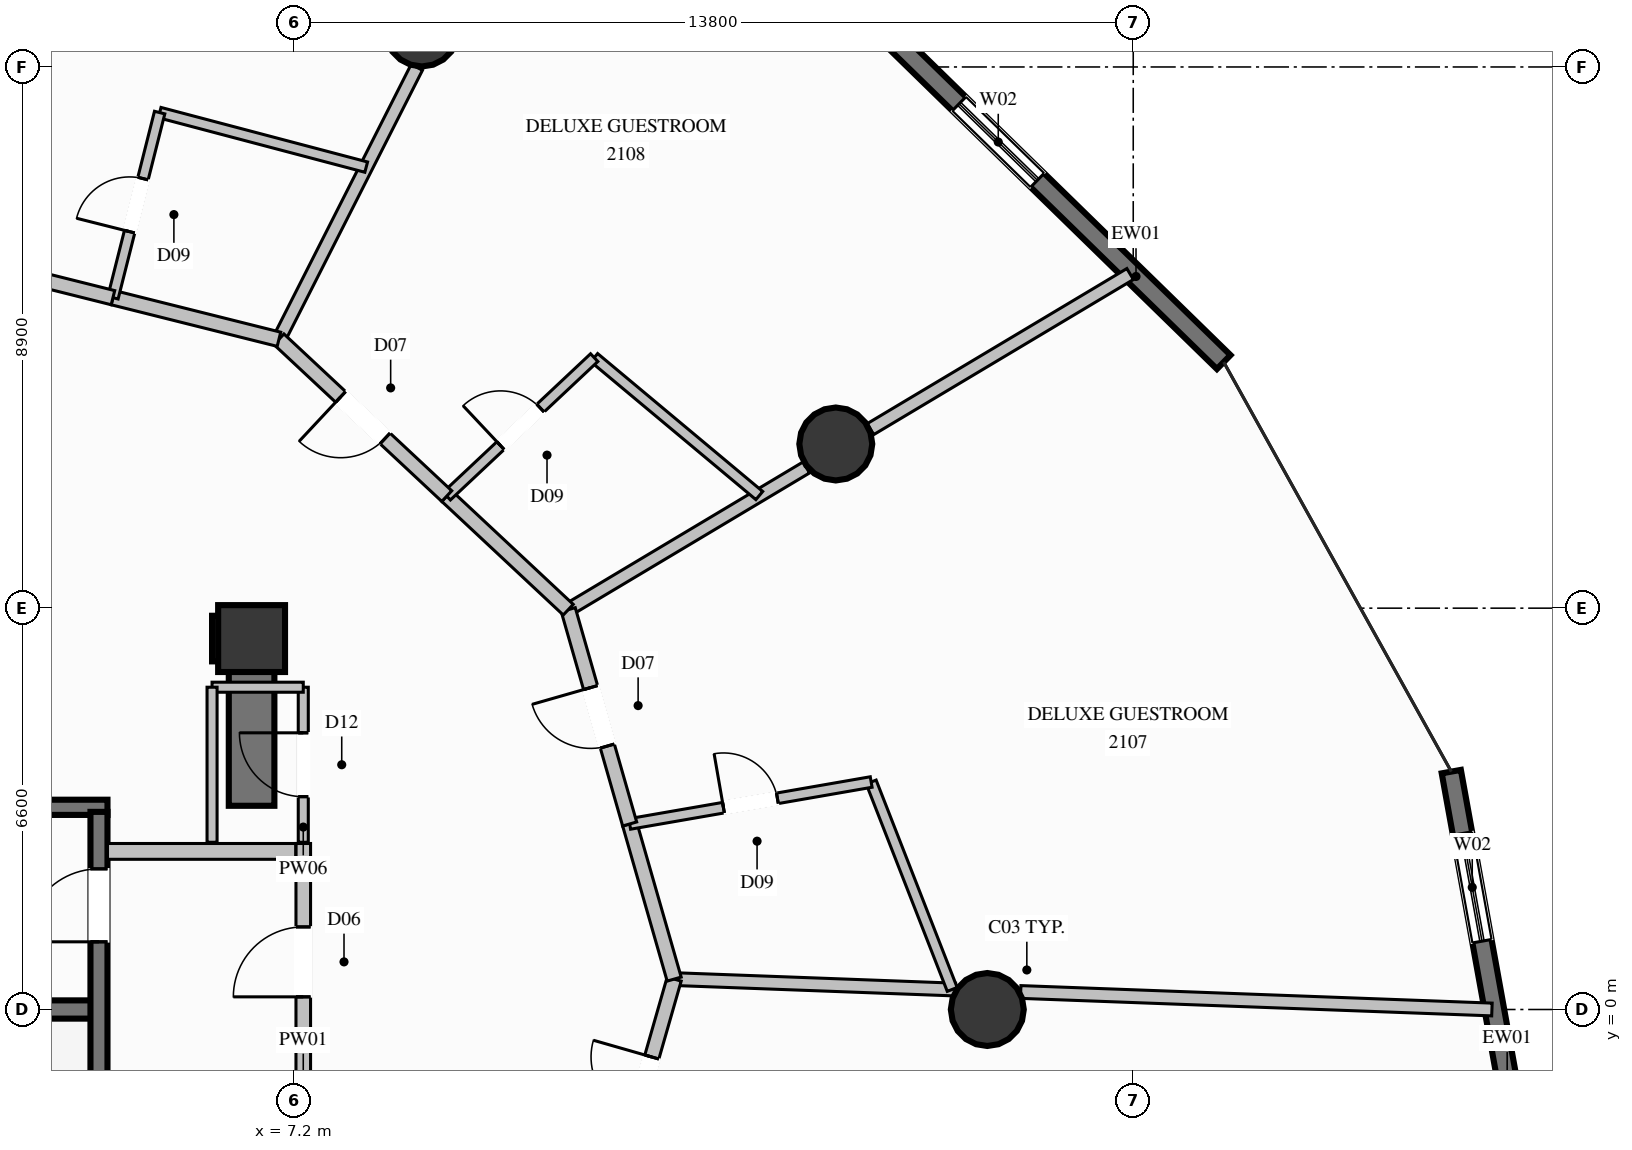
"""IFC4 building model, lengths in metres.
Left out: names, types, materials, properties, quantities, classifications, styles, units other than length and angle.
Written with IfcOpenShell. Run it as: python <this file> out.ifc"""

import sys

from ifc_helpers import new_model, si_unit, direction, frame, frame_2d, origin, origin_2d, place, context, subcontext, project, spatial, rectangle, circle, extrude, element, fill, save


model = new_model("IFC4")
c1 = context("Model", 3, precision=1e-05, world=origin(), true_north=direction((0.0, 1.0)))
c2 = subcontext(c1, "Body", "Model", "MODEL_VIEW")
j1 = project(units=[si_unit("LENGTHUNIT", "METRE"), si_unit("PLANEANGLEUNIT", "RADIAN")], contexts=[c1])
p1 = place(None, origin())
s1 = spatial("IfcSite", under=j1, at=p1, CompositionType="ELEMENT")
p2 = place(p1, origin())
s2 = spatial("IfcBuilding", under=s1, at=p2, CompositionType="ELEMENT")
p3 = place(p2, frame((0.0, 0.0, 78.8)))
s3 = spatial("IfcBuildingStorey", under=s2, at=p3, CompositionType="ELEMENT", Elevation=78.8)
p4 = place(p3, frame((6.5, 6.1, 0.0), z_axis=(0.0, 0.0, 1.0), x_axis=(1.0, 0.0, 0.0)))
e1 = element("IfcColumn", 1, at=p4, inside=s3, PredefinedType="COLUMN", context=c2, shape_type="SweptSolid", body=[
    extrude(rectangle(XDim=1.1, YDim=1.1, at=origin_2d()), origin(), (0.0, 0.0, 1.0), 3.6),
])
p5 = place(p3, frame((-3.99, 0.0, 0.0), z_axis=(0.0, 0.0, 1.0), x_axis=(1.0, 0.0, 0.0)))
e2 = element("IfcWall", 2, at=p5, inside=s3, PredefinedType="SHEAR", context=c2, shape_type="SweptSolid", body=[
    extrude(rectangle(XDim=7.98, YDim=0.3, at=frame_2d((3.99, 0.0))), origin(), (0.0, 0.0, 1.0), 3.6),
])
p6 = place(p3, frame((-4.13, 3.325, 0.0), z_axis=(0.0, 0.0, 1.0), x_axis=(1.0, 0.0, 0.0)))
e3 = element("IfcWall", 3, at=p6, inside=s3, PredefinedType="SOLIDWALL", context=c2, shape_type="SweptSolid", body=[
    extrude(rectangle(XDim=8.26, YDim=0.25, at=frame_2d((4.13, 0.0))), origin(), (0.0, 0.0, 1.0), 3.6),
])
p7 = place(p3, frame((5.85, 6.1, 0.0), z_axis=(0.0, 0.0, 1.0), x_axis=(1.0, 0.0, 0.0)))
e4 = element("IfcWall", 4, at=p7, inside=s3, PredefinedType="SHEAR", context=c2, shape_type="SweptSolid", body=[
    extrude(rectangle(XDim=0.275, YDim=0.75, at=frame_2d((0.137, 0.0))), origin(), (0.0, 0.0, 1.0), 3.6),
])
p8 = place(p3, frame((6.5, 3.35, 0.0), z_axis=(0.0, 0.0, 1.0), x_axis=(0.0, 1.0, 0.0)))
e5 = element("IfcWall", 5, at=p8, inside=s3, PredefinedType="SHEAR", context=c2, shape_type="SweptSolid", body=[
    extrude(rectangle(XDim=3.125, YDim=0.75, at=frame_2d((1.562, 0.0))), origin(), (0.0, 0.0, 1.0), 3.6),
])
for number, where, z_axis, x_axis in (
    (6, (18.6, 0.0, 0.0), (0.0, 0.0, 1.0), (1.0, 0.0, 0.0)),
    (7, (16.108, 9.3, 0.0), (0.0, 0.0, 1.0), (1.0, 0.0, 0.0)),
    (8, (9.3, 16.108, 0.0), (0.0, 0.0, 1.0), (1.0, 0.0, 0.0)),
):
    element("IfcColumn", number, at=place(p3, frame(where, z_axis=z_axis, x_axis=x_axis)), inside=s3, PredefinedType="COLUMN", context=c2, shape_type="SweptSolid", body=[
        extrude(circle(Radius=0.6, at=origin_2d()), origin(), (0.0, 0.0, 1.0), 3.6),
    ])
p9 = place(p3, frame((26.231, 3.912, 0.0), z_axis=(0.0, 0.0, 1.0), x_axis=(0.178065653106, -0.984018609165, 0.0)))
e9 = element("IfcWall", 9, at=p9, inside=s3, PredefinedType="SOLIDWALL", context=c2, shape_type="SweptSolid", body=[
    extrude(rectangle(XDim=7.234, YDim=0.32, at=frame_2d((3.617, 0.0))), origin(), (0.0, 0.0, 1.0), 3.34),
])
p10 = place(p9, frame((1.034, 0.0, 0.35)))
e10 = element("IfcOpeningElement", 10, at=p10, cuts=e9, PredefinedType="OPENING", context=c2, shape_type="SweptSolid", body=[
    extrude(rectangle(XDim=1.8, YDim=2.6, at=frame_2d((0.9, 1.3))), frame((0.0, 0.17, 0.0), z_axis=(0.0, -1.0, 0.0), x_axis=(1.0, 0.0, 0.0)), (0.0, 0.0, 1.0), 0.34),
])
p11 = place(p3, frame((16.656, 16.339, 0.0), z_axis=(0.0, 0.0, 1.0), x_axis=(0.715637667014, -0.698471709914, 0.0)))
e11 = element("IfcWall", 11, at=p11, inside=s3, PredefinedType="SOLIDWALL", context=c2, shape_type="SweptSolid", body=[
    extrude(rectangle(XDim=8.149, YDim=0.32, at=frame_2d((4.075, 0.0))), origin(), (0.0, 0.0, 1.0), 3.34),
])
p12 = place(p11, frame((2.068, 0.0, 0.35)))
e12 = element("IfcOpeningElement", 12, at=p12, cuts=e11, PredefinedType="OPENING", context=c2, shape_type="SweptSolid", body=[
    extrude(rectangle(XDim=1.8, YDim=2.6, at=frame_2d((0.9, 1.3))), frame((0.0, 0.17, 0.0), z_axis=(0.0, -1.0, 0.0), x_axis=(1.0, 0.0, 0.0)), (0.0, 0.0, 1.0), 0.34),
])
p13 = place(p3, frame((3.99, -2.21, 0.0), z_axis=(0.0, 0.0, 1.0), x_axis=(0.0, 1.0, 0.0)))
e13 = element("IfcWall", 13, at=p13, inside=s3, PredefinedType="SOLIDWALL", context=c2, shape_type="SweptSolid", body=[
    extrude(rectangle(XDim=5.46, YDim=0.28, at=frame_2d((2.73, 0.0))), origin(), (0.0, 0.0, 1.0), 3.34),
])
p14 = place(p13, frame((3.323, 0.0, 0.0)))
e14 = element("IfcOpeningElement", 14, at=p14, cuts=e13, PredefinedType="OPENING", context=c2, shape_type="SweptSolid", body=[
    extrude(rectangle(XDim=1.2, YDim=2.2, at=frame_2d((0.6, 1.1))), frame((0.0, 0.15, 0.0), z_axis=(0.0, -1.0, 0.0), x_axis=(1.0, 0.0, 0.0)), (0.0, 0.0, 1.0), 0.3),
])
p15 = place(p3, frame((7.35, -2.34, 0.0), z_axis=(0.0, 0.0, 1.0), x_axis=(0.0, 1.0, 0.0)))
e15 = element("IfcWall", 15, at=p15, inside=s3, PredefinedType="PARTITIONING", context=c2, shape_type="SweptSolid", body=[
    extrude(rectangle(XDim=5.07, YDim=0.24, at=frame_2d((2.535, 0.0))), origin(), (0.0, 0.0, 1.0), 2.425),
])
p16 = place(p15, frame((2.548, 0.0, 0.0)))
e16 = element("IfcOpeningElement", 16, at=p16, cuts=e15, PredefinedType="OPENING", context=c2, shape_type="SweptSolid", body=[
    extrude(rectangle(XDim=1.15, YDim=2.2, at=frame_2d((0.575, 1.1))), frame((0.0, 0.13, 0.0), z_axis=(0.0, -1.0, 0.0), x_axis=(1.0, 0.0, 0.0)), (0.0, 0.0, 1.0), 0.26),
])
p17 = place(p3, frame((4.13, 2.6, 0.0), z_axis=(0.0, 0.0, 1.0), x_axis=(1.0, 0.0, 0.0)))
e17 = element("IfcWall", 17, at=p17, inside=s3, PredefinedType="PARTITIONING", context=c2, shape_type="SweptSolid", body=[
    extrude(rectangle(XDim=3.095, YDim=0.26, at=frame_2d((1.548, 0.0))), origin(), (0.0, 0.0, 1.0), 3.34),
])
p18 = place(p3, frame((7.35, 2.75, 0.0), z_axis=(0.0, 0.0, 1.0), x_axis=(0.0, 1.0, 0.0)))
e18 = element("IfcWall", 18, at=p18, inside=s3, PredefinedType="PARTITIONING", context=c2, shape_type="SweptSolid", body=[
    extrude(rectangle(XDim=2.55, YDim=0.165, at=frame_2d((1.275, 0.0))), origin(), (0.0, 0.0, 1.0), 3.34),
])
p19 = place(p18, frame((0.75, 0.0, 0.0)))
e19 = element("IfcOpeningElement", 19, at=p19, cuts=e18, PredefinedType="OPENING", context=c2, shape_type="SweptSolid", body=[
    extrude(rectangle(XDim=1.05, YDim=2.15, at=frame_2d((0.525, 1.075))), frame((0.0, 0.093, 0.0), z_axis=(0.0, -1.0, 0.0), x_axis=(1.0, 0.0, 0.0)), (0.0, 0.0, 1.0), 0.185),
])
p20 = place(p3, frame((7.35, 5.3, 0.0), z_axis=(0.0, 0.0, 1.0), x_axis=(-1.0, 0.0, 0.0)))
e20 = element("IfcWall", 20, at=p20, inside=s3, PredefinedType="PARTITIONING", context=c2, shape_type="SweptSolid", body=[
    extrude(rectangle(XDim=1.5, YDim=0.165, at=frame_2d((0.75, 0.0))), origin(), (0.0, 0.0, 1.0), 2.425),
])
p21 = place(p3, frame((5.85, 5.3, 0.0), z_axis=(0.0, 0.0, 1.0), x_axis=(0.0, -1.0, 0.0)))
e21 = element("IfcWall", 21, at=p21, inside=s3, PredefinedType="PARTITIONING", context=c2, shape_type="SweptSolid", body=[
    extrude(rectangle(XDim=2.55, YDim=0.165, at=frame_2d((1.275, 0.0))), origin(), (0.0, 0.0, 1.0), 2.425),
])
p22 = place(p3, frame((13.45, 0.5, 0.0), z_axis=(0.0, 0.0, 1.0), x_axis=(0.999307950313, -0.037197048837, 0.0)))
e22 = element("IfcWall", 22, at=p22, inside=s3, PredefinedType="PARTITIONING", context=c2, shape_type="SweptSolid", body=[
    extrude(rectangle(XDim=4.627, YDim=0.21, at=frame_2d((2.313, 0.0))), origin(), (0.0, 0.0, 1.0), 3.34),
])
p23 = place(p3, frame((19.149, 0.288, 0.0), z_axis=(0.0, 0.0, 1.0), x_axis=(0.999309822295, -0.037146723485, 0.0)))
e23 = element("IfcWall", 23, at=p23, inside=s3, PredefinedType="PARTITIONING", context=c2, shape_type="SweptSolid", body=[
    extrude(rectangle(XDim=7.755, YDim=0.21, at=frame_2d((3.878, 0.0))), origin(), (0.0, 0.0, 1.0), 3.34),
])
p24 = place(p3, frame((11.708, 6.575, 0.0), z_axis=(0.0, 0.0, 1.0), x_axis=(0.858450301557, 0.512896753506, 0.0)))
e24 = element("IfcWall", 24, at=p24, inside=s3, PredefinedType="PARTITIONING", context=c2, shape_type="SweptSolid", body=[
    extrude(rectangle(XDim=4.561, YDim=0.21, at=frame_2d((2.28, 0.0))), origin(), (0.0, 0.0, 1.0), 2.708),
])
p25 = place(p3, frame((16.678, 9.544, 0.0), z_axis=(0.0, 0.0, 1.0), x_axis=(0.858517464023, 0.512784325002, 0.0)))
e25 = element("IfcWall", 25, at=p25, inside=s3, PredefinedType="PARTITIONING", context=c2, shape_type="SweptSolid", body=[
    extrude(rectangle(XDim=4.975, YDim=0.21, at=frame_2d((2.487, 0.0))), origin(), (0.0, 0.0, 1.0), 3.34),
])
p26 = place(p3, frame((6.95, 11.022, 0.0), z_axis=(0.0, 0.0, 1.0), x_axis=(0.452173499379, 0.891930000874, 0.0)))
e26 = element("IfcWall", 26, at=p26, inside=s3, PredefinedType="PARTITIONING", context=c2, shape_type="SweptSolid", body=[
    extrude(rectangle(XDim=5.014, YDim=0.21, at=frame_2d((2.507, 0.0))), origin(), (0.0, 0.0, 1.0), 2.708),
])
p27 = place(p3, frame((12.44, -3.024, 0.0), z_axis=(0.0, 0.0, 1.0), x_axis=(0.275521481409, 0.961294914832, 0.0)))
e27 = element("IfcWall", 27, at=p27, inside=s3, PredefinedType="PARTITIONING", context=c2, shape_type="SweptSolid", body=[
    extrude(rectangle(XDim=3.666, YDim=0.24, at=frame_2d((1.833, 0.0))), origin(), (0.0, 0.0, 1.0), 2.918),
])
p28 = place(p27, frame((1.333, 0.0, 0.0)))
e28 = element("IfcOpeningElement", 28, at=p28, cuts=e27, PredefinedType="OPENING", context=c2, shape_type="SweptSolid", body=[
    extrude(rectangle(XDim=1.0, YDim=2.2, at=frame_2d((0.5, 1.1))), frame((0.0, 0.13, 0.0), z_axis=(0.0, -1.0, 0.0), x_axis=(1.0, 0.0, 0.0)), (0.0, 0.0, 1.0), 0.26),
])
p29 = place(p3, frame((13.45, 0.5, 0.0), z_axis=(0.0, 0.0, 1.0), x_axis=(-0.275790140823, 0.961217872402, 0.0)))
e29 = element("IfcWall", 29, at=p29, inside=s3, PredefinedType="PARTITIONING", context=c2, shape_type="SweptSolid", body=[
    extrude(rectangle(XDim=2.654, YDim=0.24, at=frame_2d((1.327, 0.0))), origin(), (0.0, 0.0, 1.0), 3.34),
])
p30 = place(p3, frame((18.023, 0.33, 0.0), z_axis=(0.0, 0.0, 1.0), x_axis=(-0.363999643281, 0.931399087229, 0.0)))
e30 = element("IfcWall", 30, at=p30, inside=s3, PredefinedType="PLUMBINGWALL", context=c2, shape_type="SweptSolid", body=[
    extrude(rectangle(XDim=3.662, YDim=0.175, at=frame_2d((1.831, 0.0))), origin(), (0.0, 0.0, 1.0), 2.793),
])
p31 = place(p3, frame((12.718, 3.051, 0.0), z_axis=(0.0, 0.0, 1.0), x_axis=(0.985246403714, 0.171141824138, 0.0)))
e31 = element("IfcWall", 31, at=p31, inside=s3, PredefinedType="PLUMBINGWALL", context=c2, shape_type="SweptSolid", body=[
    extrude(rectangle(XDim=4.031, YDim=0.175, at=frame_2d((2.016, 0.0))), origin(), (0.0, 0.0, 1.0), 3.34),
])
p32 = place(p31, frame((1.566, 0.0, 0.0)))
e32 = element("IfcOpeningElement", 32, at=p32, cuts=e31, PredefinedType="OPENING", context=c2, shape_type="SweptSolid", body=[
    extrude(rectangle(XDim=0.9, YDim=2.1, at=frame_2d((0.45, 1.05))), frame((0.0, 0.098, 0.0), z_axis=(0.0, -1.0, 0.0), x_axis=(1.0, 0.0, 0.0)), (0.0, 0.0, 1.0), 0.195),
])
p33 = place(p3, frame((12.718, 3.051, 0.0), z_axis=(0.0, 0.0, 1.0), x_axis=(-0.275521481409, 0.961294914832, 0.0)))
e33 = element("IfcWall", 33, at=p33, inside=s3, PredefinedType="PARTITIONING", context=c2, shape_type="SweptSolid", body=[
    extrude(rectangle(XDim=3.666, YDim=0.24, at=frame_2d((1.833, 0.0))), origin(), (0.0, 0.0, 1.0), 2.918),
])
p34 = place(p33, frame((1.333, 0.0, 0.0)))
e34 = element("IfcOpeningElement", 34, at=p34, cuts=e33, PredefinedType="OPENING", context=c2, shape_type="SweptSolid", body=[
    extrude(rectangle(XDim=1.0, YDim=2.2, at=frame_2d((0.5, 1.1))), frame((0.0, 0.13, 0.0), z_axis=(0.0, -1.0, 0.0), x_axis=(1.0, 0.0, 0.0)), (0.0, 0.0, 1.0), 0.26),
])
p35 = place(p3, frame((11.708, 6.575, 0.0), z_axis=(0.0, 0.0, 1.0), x_axis=(-0.730449499178, 0.682966711597, 0.0)))
e35 = element("IfcWall", 35, at=p35, inside=s3, PredefinedType="PARTITIONING", context=c2, shape_type="SweptSolid", body=[
    extrude(rectangle(XDim=2.735, YDim=0.24, at=frame_2d((1.368, 0.0))), origin(), (0.0, 0.0, 1.0), 3.34),
])
p36 = place(p3, frame((14.85, 8.452, 0.0), z_axis=(0.0, 0.0, 1.0), x_axis=(-0.767457100914, 0.641100302805, 0.0)))
e36 = element("IfcWall", 36, at=p36, inside=s3, PredefinedType="PLUMBINGWALL", context=c2, shape_type="SweptSolid", body=[
    extrude(rectangle(XDim=3.538, YDim=0.175, at=frame_2d((1.769, 0.0))), origin(), (0.0, 0.0, 1.0), 3.34),
])
p37 = place(p3, frame((9.71, 8.443, 0.0), z_axis=(0.0, 0.0, 1.0), x_axis=(0.729031175157, 0.684480493257, 0.0)))
e37 = element("IfcWall", 37, at=p37, inside=s3, PredefinedType="PLUMBINGWALL", context=c2, shape_type="SweptSolid", body=[
    extrude(rectangle(XDim=3.326, YDim=0.175, at=frame_2d((1.663, 0.0))), origin(), (0.0, 0.0, 1.0), 3.34),
])
p38 = place(p37, frame((1.213, 0.0, 0.0)))
e38 = element("IfcOpeningElement", 38, at=p38, cuts=e37, PredefinedType="OPENING", context=c2, shape_type="SweptSolid", body=[
    extrude(rectangle(XDim=0.9, YDim=2.1, at=frame_2d((0.45, 1.05))), frame((0.0, 0.098, 0.0), z_axis=(0.0, -1.0, 0.0), x_axis=(1.0, 0.0, 0.0)), (0.0, 0.0, 1.0), 0.195),
])
p39 = place(p3, frame((9.71, 8.443, 0.0), z_axis=(0.0, 0.0, 1.0), x_axis=(-0.730679025356, 0.682721145054, 0.0)))
e39 = element("IfcWall", 39, at=p39, inside=s3, PredefinedType="PARTITIONING", context=c2, shape_type="SweptSolid", body=[
    extrude(rectangle(XDim=3.777, YDim=0.24, at=frame_2d((1.889, 0.0))), origin(), (0.0, 0.0, 1.0), 3.34),
])
p40 = place(p39, frame((1.389, 0.0, 0.0)))
e40 = element("IfcOpeningElement", 40, at=p40, cuts=e39, PredefinedType="OPENING", context=c2, shape_type="SweptSolid", body=[
    extrude(rectangle(XDim=1.0, YDim=2.2, at=frame_2d((0.5, 1.1))), frame((0.0, 0.13, 0.0), z_axis=(0.0, -1.0, 0.0), x_axis=(1.0, 0.0, 0.0)), (0.0, 0.0, 1.0), 0.26),
])
p41 = place(p3, frame((6.95, 11.022, 0.0), z_axis=(0.0, 0.0, 1.0), x_axis=(-0.970009682466, 0.243066278865, 0.0)))
e41 = element("IfcWall", 41, at=p41, inside=s3, PredefinedType="PARTITIONING", context=c2, shape_type="SweptSolid", body=[
    extrude(rectangle(XDim=2.814, YDim=0.24, at=frame_2d((1.407, 0.0))), origin(), (0.0, 0.0, 1.0), 3.34),
])
p42 = place(p3, frame((8.385, 13.853, 0.0), z_axis=(0.0, 0.0, 1.0), x_axis=(-0.966861774652, 0.255300428351, 0.0)))
e42 = element("IfcWall", 42, at=p42, inside=s3, PredefinedType="PLUMBINGWALL", context=c2, shape_type="SweptSolid", body=[
    extrude(rectangle(XDim=3.513, YDim=0.175, at=frame_2d((1.757, 0.0))), origin(), (0.0, 0.0, 1.0), 3.34),
])
p43 = place(p3, frame((4.22, 11.706, 0.0), z_axis=(0.0, 0.0, 1.0), x_axis=(0.24465764931, 0.969609526889, 0.0)))
e43 = element("IfcWall", 43, at=p43, inside=s3, PredefinedType="PLUMBINGWALL", context=c2, shape_type="SweptSolid", body=[
    extrude(rectangle(XDim=3.139, YDim=0.175, at=frame_2d((1.57, 0.0))), origin(), (0.0, 0.0, 1.0), 3.34),
])
p44 = place(p43, frame((1.12, 0.0, 0.0)))
e44 = element("IfcOpeningElement", 44, at=p44, cuts=e43, PredefinedType="OPENING", context=c2, shape_type="SweptSolid", body=[
    extrude(rectangle(XDim=0.9, YDim=2.1, at=frame_2d((0.45, 1.05))), frame((0.0, 0.098, 0.0), z_axis=(0.0, -1.0, 0.0), x_axis=(1.0, 0.0, 0.0)), (0.0, 0.0, 1.0), 0.195),
])
p45 = place(p3, frame((4.22, 11.706, 0.0), z_axis=(0.0, 0.0, 1.0), x_axis=(-0.970061149619, 0.24286079552, 0.0)))
e45 = element("IfcWall", 45, at=p45, inside=s3, PredefinedType="PARTITIONING", context=c2, shape_type="SweptSolid", body=[
    extrude(rectangle(XDim=3.886, YDim=0.24, at=frame_2d((1.943, 0.0))), origin(), (0.0, 0.0, 1.0), 2.918),
])
p46 = place(p45, frame((1.443, 0.0, 0.0)))
e46 = element("IfcOpeningElement", 46, at=p46, cuts=e45, PredefinedType="OPENING", context=c2, shape_type="SweptSolid", body=[
    extrude(rectangle(XDim=1.0, YDim=2.2, at=frame_2d((0.5, 1.1))), frame((0.0, 0.13, 0.0), z_axis=(0.0, -1.0, 0.0), x_axis=(1.0, 0.0, 0.0)), (0.0, 0.0, 1.0), 0.26),
])
p47 = place(p10, origin())
e47 = element("IfcWindow", 47, at=p47, inside=s3, PartitioningType="SINGLE_PANEL", PredefinedType="WINDOW", context=c2, shape_type="SweptSolid", body=[
    extrude(rectangle(XDim=1.8, YDim=2.6, at=frame_2d((0.9, 1.3))), frame((0.0, 0.03, 0.0), z_axis=(0.0, -1.0, 0.0), x_axis=(1.0, 0.0, 0.0)), (0.0, 0.0, 1.0), 0.06),
])
fill(e10, e47)
p48 = place(p12, origin())
e48 = element("IfcWindow", 48, at=p48, inside=s3, PartitioningType="SINGLE_PANEL", PredefinedType="WINDOW", context=c2, shape_type="SweptSolid", body=[
    extrude(rectangle(XDim=1.8, YDim=2.6, at=frame_2d((0.9, 1.3))), frame((0.0, 0.03, 0.0), z_axis=(0.0, -1.0, 0.0), x_axis=(1.0, 0.0, 0.0)), (0.0, 0.0, 1.0), 0.06),
])
fill(e12, e48)
p49 = place(p14, origin())
e49 = element("IfcDoor", 49, at=p49, inside=s3, OperationType="SINGLE_SWING_LEFT", PredefinedType="DOOR", context=c2, shape_type="SweptSolid", body=[
    extrude(rectangle(XDim=1.2, YDim=2.2, at=frame_2d((0.6, 1.1))), frame((0.0, 0.025, 0.0), z_axis=(0.0, -1.0, 0.0), x_axis=(1.0, 0.0, 0.0)), (0.0, 0.0, 1.0), 0.05),
])
fill(e14, e49)
p50 = place(p16, origin())
e50 = element("IfcDoor", 50, at=p50, inside=s3, OperationType="SINGLE_SWING_LEFT", PredefinedType="DOOR", context=c2, shape_type="SweptSolid", body=[
    extrude(rectangle(XDim=1.15, YDim=2.2, at=frame_2d((0.575, 1.1))), frame((0.0, 0.025, 0.0), z_axis=(0.0, -1.0, 0.0), x_axis=(1.0, 0.0, 0.0)), (0.0, 0.0, 1.0), 0.05),
])
fill(e16, e50)
p51 = place(p19, origin())
e51 = element("IfcDoor", 51, at=p51, inside=s3, OperationType="SINGLE_SWING_RIGHT", PredefinedType="DOOR", context=c2, shape_type="SweptSolid", body=[
    extrude(rectangle(XDim=1.05, YDim=2.15, at=frame_2d((0.525, 1.075))), frame((0.0, 0.025, 0.0), z_axis=(0.0, -1.0, 0.0), x_axis=(1.0, 0.0, 0.0)), (0.0, 0.0, 1.0), 0.05),
])
fill(e19, e51)
p52 = place(p28, origin())
e52 = element("IfcDoor", 52, at=p52, inside=s3, OperationType="SINGLE_SWING_RIGHT", PredefinedType="DOOR", context=c2, shape_type="SweptSolid", body=[
    extrude(rectangle(XDim=1.0, YDim=2.2, at=frame_2d((0.5, 1.1))), frame((0.0, 0.025, 0.0), z_axis=(0.0, -1.0, 0.0), x_axis=(1.0, 0.0, 0.0)), (0.0, 0.0, 1.0), 0.05),
])
fill(e28, e52)
p53 = place(p32, origin())
e53 = element("IfcDoor", 53, at=p53, inside=s3, OperationType="SINGLE_SWING_LEFT", PredefinedType="DOOR", context=c2, shape_type="SweptSolid", body=[
    extrude(rectangle(XDim=0.9, YDim=2.1, at=frame_2d((0.45, 1.05))), frame((0.0, 0.025, 0.0), z_axis=(0.0, -1.0, 0.0), x_axis=(1.0, 0.0, 0.0)), (0.0, 0.0, 1.0), 0.05),
])
fill(e32, e53)
p54 = place(p34, origin())
e54 = element("IfcDoor", 54, at=p54, inside=s3, OperationType="SINGLE_SWING_RIGHT", PredefinedType="DOOR", context=c2, shape_type="SweptSolid", body=[
    extrude(rectangle(XDim=1.0, YDim=2.2, at=frame_2d((0.5, 1.1))), frame((0.0, 0.025, 0.0), z_axis=(0.0, -1.0, 0.0), x_axis=(1.0, 0.0, 0.0)), (0.0, 0.0, 1.0), 0.05),
])
fill(e34, e54)
p55 = place(p38, origin())
e55 = element("IfcDoor", 55, at=p55, inside=s3, OperationType="SINGLE_SWING_LEFT", PredefinedType="DOOR", context=c2, shape_type="SweptSolid", body=[
    extrude(rectangle(XDim=0.9, YDim=2.1, at=frame_2d((0.45, 1.05))), frame((0.0, 0.025, 0.0), z_axis=(0.0, -1.0, 0.0), x_axis=(1.0, 0.0, 0.0)), (0.0, 0.0, 1.0), 0.05),
])
fill(e38, e55)
p56 = place(p40, origin())
e56 = element("IfcDoor", 56, at=p56, inside=s3, OperationType="SINGLE_SWING_RIGHT", PredefinedType="DOOR", context=c2, shape_type="SweptSolid", body=[
    extrude(rectangle(XDim=1.0, YDim=2.2, at=frame_2d((0.5, 1.1))), frame((0.0, 0.025, 0.0), z_axis=(0.0, -1.0, 0.0), x_axis=(1.0, 0.0, 0.0)), (0.0, 0.0, 1.0), 0.05),
])
fill(e40, e56)
p57 = place(p44, origin())
e57 = element("IfcDoor", 57, at=p57, inside=s3, OperationType="SINGLE_SWING_LEFT", PredefinedType="DOOR", context=c2, shape_type="SweptSolid", body=[
    extrude(rectangle(XDim=0.9, YDim=2.1, at=frame_2d((0.45, 1.05))), frame((0.0, 0.025, 0.0), z_axis=(0.0, -1.0, 0.0), x_axis=(1.0, 0.0, 0.0)), (0.0, 0.0, 1.0), 0.05),
])
fill(e44, e57)
save(model, sys.argv[1])
